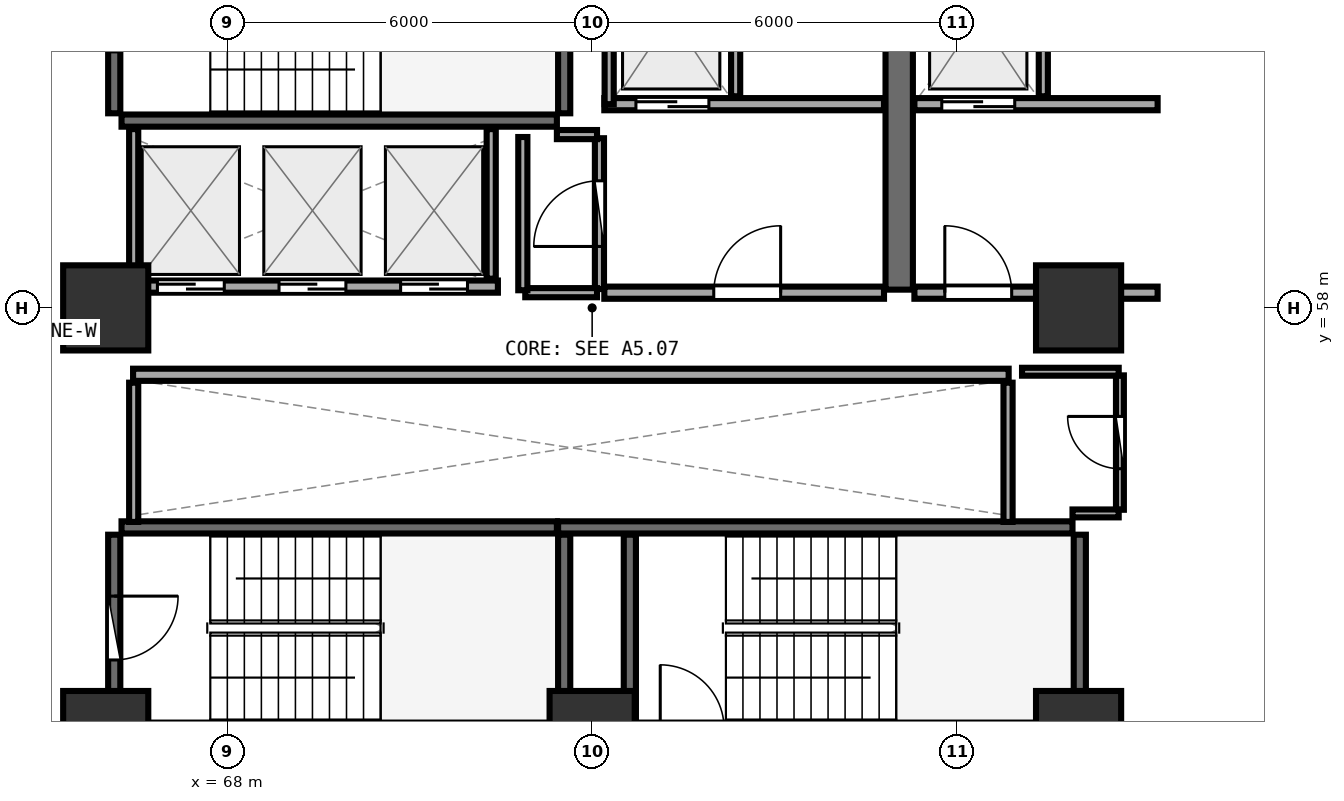
"""IFC4 building model, lengths in metres.
Left out: names, types, materials, properties, quantities, classifications, styles, units other than length and angle.
Written with IfcOpenShell. Run it as: python <this file> out.ifc"""

import sys

from ifc_helpers import new_model, si_unit, direction, frame, frame_2d, origin, origin_2d, place, context, subcontext, project, spatial, rectangle, extrude, element, fill, save


model = new_model("IFC4")
c1 = context("Model", 3, precision=1e-05, world=origin(), true_north=direction((0.0, 1.0)))
c2 = subcontext(c1, "Body", "Model", "MODEL_VIEW")
j1 = project(units=[si_unit("LENGTHUNIT", "METRE"), si_unit("PLANEANGLEUNIT", "RADIAN")], contexts=[c1])
p1 = place(None, origin())
s1 = spatial("IfcSite", under=j1, at=p1, CompositionType="ELEMENT")
p2 = place(p1, origin())
s2 = spatial("IfcBuilding", under=s1, at=p2, CompositionType="ELEMENT")
p3 = place(p2, frame((0.0, 0.0, 98.85)))
s3 = spatial("IfcBuildingStorey", under=s2, at=p3, CompositionType="ELEMENT", Elevation=98.85)
for number, where, z_axis, x_axis in (
    (1, (66.0, 51.0, 0.0), (0.0, 0.0, 1.0), (1.0, 0.0, 0.0)),
    (2, (74.0, 51.0, 0.0), (0.0, 0.0, 1.0), (1.0, 0.0, 0.0)),
    (3, (82.0, 51.0, 0.0), (0.0, 0.0, 1.0), (1.0, 0.0, 0.0)),
    (4, (82.0, 58.0, 0.0), (0.0, 0.0, 1.0), (1.0, 0.0, 0.0)),
    (5, (66.0, 58.0, 0.0), (0.0, 0.0, 1.0), (1.0, 0.0, 0.0)),
):
    element("IfcColumn", number, at=place(p3, frame(where, z_axis=z_axis, x_axis=x_axis)), inside=s3, PredefinedType="PILASTER", context=c2, shape_type="SweptSolid", body=[
        extrude(rectangle(XDim=1.4, YDim=1.4, at=origin_2d()), origin(), (0.0, 0.0, 1.0), 3.75),
    ])
p4 = place(p3, frame((66.26, 61.08, 0.0), z_axis=(0.0, 0.0, 1.0), x_axis=(1.0, 0.0, 0.0)))
e6 = element("IfcWall", 6, at=p4, inside=s3, PredefinedType="SHEAR", context=c2, shape_type="SweptSolid", body=[
    extrude(rectangle(XDim=7.16, YDim=0.2, at=frame_2d((3.58, 0.0))), origin(), (0.0, 0.0, 1.0), 3.49),
])
p5 = place(p3, frame((73.54, 61.2, 0.0), z_axis=(0.0, 0.0, 1.0), x_axis=(0.0, 1.0, 0.0)))
e7 = element("IfcWall", 7, at=p5, inside=s3, PredefinedType="SHEAR", context=c2, shape_type="SweptSolid", body=[
    extrude(rectangle(XDim=3.07, YDim=0.2, at=frame_2d((1.535, 0.0))), origin(), (0.0, 0.0, 1.0), 3.49),
])
p6 = place(p3, frame((66.14, 64.27, 0.0), z_axis=(0.0, 0.0, 1.0), x_axis=(0.0, -1.0, 0.0)))
e8 = element("IfcWall", 8, at=p6, inside=s3, PredefinedType="SHEAR", context=c2, shape_type="SweptSolid", body=[
    extrude(rectangle(XDim=3.07, YDim=0.2, at=frame_2d((1.535, 0.0))), origin(), (0.0, 0.0, 1.0), 3.49),
])
p7 = place(p6, frame((1.01, 0.0, 0.0)))
e9 = element("IfcOpeningElement", 9, at=p7, cuts=e8, PredefinedType="OPENING", context=c2, shape_type="SweptSolid", body=[
    extrude(rectangle(XDim=1.05, YDim=2.1, at=frame_2d((0.525, 1.05))), frame((0.0, 0.11, 0.0), z_axis=(0.0, -1.0, 0.0), x_axis=(1.0, 0.0, 0.0)), (0.0, 0.0, 1.0), 0.22),
])
p8 = place(p3, frame((82.02, 51.2, 0.0), z_axis=(0.0, 0.0, 1.0), x_axis=(0.0, 1.0, 0.0)))
e10 = element("IfcWall", 10, at=p8, inside=s3, PredefinedType="SHEAR", context=c2, shape_type="SweptSolid", body=[
    extrude(rectangle(XDim=3.07, YDim=0.2, at=frame_2d((1.535, 0.0))), origin(), (0.0, 0.0, 1.0), 3.49),
])
p9 = place(p3, frame((81.9, 54.39, 0.0), z_axis=(0.0, 0.0, 1.0), x_axis=(-1.0, 0.0, 0.0)))
e11 = element("IfcWall", 11, at=p9, inside=s3, PredefinedType="SHEAR", context=c2, shape_type="SweptSolid", body=[
    extrude(rectangle(XDim=8.46, YDim=0.2, at=frame_2d((4.23, 0.0))), origin(), (0.0, 0.0, 1.0), 3.49),
])
for number, where, z_axis, x_axis in (
    (12, (74.62, 54.27, 0.0), (0.0, 0.0, 1.0), (0.0, -1.0, 0.0)),
    (13, (73.54, 51.2, 0.0), (0.0, 0.0, 1.0), (0.0, 1.0, 0.0)),
):
    element("IfcWall", number, at=place(p3, frame(where, z_axis=z_axis, x_axis=x_axis)), inside=s3, PredefinedType="SHEAR", context=c2, shape_type="SweptSolid", body=[
        extrude(rectangle(XDim=3.07, YDim=0.2, at=frame_2d((1.535, 0.0))), origin(), (0.0, 0.0, 1.0), 3.49),
    ])
p10 = place(p3, frame((73.42, 54.39, 0.0), z_axis=(0.0, 0.0, 1.0), x_axis=(-1.0, 0.0, 0.0)))
e14 = element("IfcWall", 14, at=p10, inside=s3, PredefinedType="SHEAR", context=c2, shape_type="SweptSolid", body=[
    extrude(rectangle(XDim=7.16, YDim=0.2, at=frame_2d((3.58, 0.0))), origin(), (0.0, 0.0, 1.0), 3.49),
])
p11 = place(p3, frame((66.14, 54.27, 0.0), z_axis=(0.0, 0.0, 1.0), x_axis=(0.0, -1.0, 0.0)))
e15 = element("IfcWall", 15, at=p11, inside=s3, PredefinedType="SHEAR", context=c2, shape_type="SweptSolid", body=[
    extrude(rectangle(XDim=3.07, YDim=0.2, at=frame_2d((1.535, 0.0))), origin(), (0.0, 0.0, 1.0), 3.49),
])
p12 = place(p11, frame((1.01, 0.0, 0.0)))
e16 = element("IfcOpeningElement", 16, at=p12, cuts=e15, PredefinedType="OPENING", context=c2, shape_type="SweptSolid", body=[
    extrude(rectangle(XDim=1.05, YDim=2.1, at=frame_2d((0.525, 1.05))), frame((0.0, 0.11, 0.0), z_axis=(0.0, -1.0, 0.0), x_axis=(1.0, 0.0, 0.0)), (0.0, 0.0, 1.0), 0.22),
])
p13 = place(p3, frame((79.05, 58.3, 0.0), z_axis=(0.0, 0.0, 1.0), x_axis=(0.0, 1.0, 0.0)))
e17 = element("IfcWall", 17, at=p13, inside=s3, PredefinedType="SHEAR", context=c2, shape_type="SweptSolid", body=[
    extrude(rectangle(XDim=6.3, YDim=0.45, at=frame_2d((3.15, 0.0))), origin(), (0.0, 0.0, 1.0), 3.49),
])
p14 = place(p3, frame((74.2, 61.35, 0.0), z_axis=(0.0, 0.0, 1.0), x_axis=(1.0, 0.0, 0.0)))
e18 = element("IfcWall", 18, at=p14, inside=s3, PredefinedType="SOLIDWALL", context=c2, shape_type="SweptSolid", body=[
    extrude(rectangle(XDim=4.6, YDim=0.2, at=frame_2d((2.3, 0.0))), origin(), (0.0, 0.0, 1.0), 3.48),
])
p15 = place(p14, frame((0.52, 0.0, 0.0)))
e19 = element("IfcOpeningElement", 19, at=p15, cuts=e18, PredefinedType="OPENING", context=c2, shape_type="SweptSolid", body=[
    extrude(rectangle(XDim=1.2, YDim=2.15, at=frame_2d((0.6, 1.075))), frame((0.0, 0.11, 0.0), z_axis=(0.0, -1.0, 0.0), x_axis=(1.0, 0.0, 0.0)), (0.0, 0.0, 1.0), 0.22),
])
p16 = place(p3, frame((74.28, 61.35, 0.0), z_axis=(0.0, 0.0, 1.0), x_axis=(0.0, 1.0, 0.0)))
e20 = element("IfcWall", 20, at=p16, inside=s3, PredefinedType="PARTITIONING", context=c2, shape_type="SweptSolid", body=[
    extrude(rectangle(XDim=2.97, YDim=0.15, at=frame_2d((1.485, 0.0))), origin(), (0.0, 0.0, 1.0), 3.48),
])
p17 = place(p3, frame((76.36, 61.48, 0.0), z_axis=(0.0, 0.0, 1.0), x_axis=(0.0, 1.0, 0.0)))
e21 = element("IfcWall", 21, at=p17, inside=s3, PredefinedType="PARTITIONING", context=c2, shape_type="SweptSolid", body=[
    extrude(rectangle(XDim=2.84, YDim=0.15, at=frame_2d((1.42, 0.0))), origin(), (0.0, 0.0, 1.0), 3.48),
])
p18 = place(p3, frame((79.3, 61.35, 0.0), z_axis=(0.0, 0.0, 1.0), x_axis=(1.0, 0.0, 0.0)))
e22 = element("IfcWall", 22, at=p18, inside=s3, PredefinedType="SOLIDWALL", context=c2, shape_type="SweptSolid", body=[
    extrude(rectangle(XDim=4.0, YDim=0.2, at=frame_2d((2.0, 0.0))), origin(), (0.0, 0.0, 1.0), 2.775),
])
p19 = place(p18, frame((0.45, 0.0, 0.0)))
e23 = element("IfcOpeningElement", 23, at=p19, cuts=e22, PredefinedType="OPENING", context=c2, shape_type="SweptSolid", body=[
    extrude(rectangle(XDim=1.2, YDim=2.15, at=frame_2d((0.6, 1.075))), frame((0.0, 0.11, 0.0), z_axis=(0.0, -1.0, 0.0), x_axis=(1.0, 0.0, 0.0)), (0.0, 0.0, 1.0), 0.22),
])
p20 = place(p3, frame((81.42, 61.48, 0.0), z_axis=(0.0, 0.0, 1.0), x_axis=(0.0, 1.0, 0.0)))
e24 = element("IfcWall", 24, at=p20, inside=s3, PredefinedType="PARTITIONING", context=c2, shape_type="SweptSolid", body=[
    extrude(rectangle(XDim=2.84, YDim=0.15, at=frame_2d((1.42, 0.0))), origin(), (0.0, 0.0, 1.0), 3.48),
])
p21 = place(p3, frame((74.2, 58.25, 0.0), z_axis=(0.0, 0.0, 1.0), x_axis=(1.0, 0.0, 0.0)))
e25 = element("IfcWall", 25, at=p21, inside=s3, PredefinedType="SOLIDWALL", context=c2, shape_type="SweptSolid", body=[
    extrude(rectangle(XDim=4.6, YDim=0.2, at=frame_2d((2.3, 0.0))), origin(), (0.0, 0.0, 1.0), 3.48),
])
p22 = place(p21, frame((1.8, 0.0, 0.0)))
e26 = element("IfcOpeningElement", 26, at=p22, cuts=e25, PredefinedType="OPENING", context=c2, shape_type="SweptSolid", body=[
    extrude(rectangle(XDim=1.1, YDim=2.1, at=frame_2d((0.55, 1.05))), frame((0.0, 0.11, 0.0), z_axis=(0.0, -1.0, 0.0), x_axis=(1.0, 0.0, 0.0)), (0.0, 0.0, 1.0), 0.22),
])
p23 = place(p3, frame((79.3, 58.25, 0.0), z_axis=(0.0, 0.0, 1.0), x_axis=(1.0, 0.0, 0.0)))
e27 = element("IfcWall", 27, at=p23, inside=s3, PredefinedType="SOLIDWALL", context=c2, shape_type="SweptSolid", body=[
    extrude(rectangle(XDim=4.0, YDim=0.2, at=frame_2d((2.0, 0.0))), origin(), (0.0, 0.0, 1.0), 2.775),
])
p24 = place(p23, frame((0.5, 0.0, 0.0)))
e28 = element("IfcOpeningElement", 28, at=p24, cuts=e27, PredefinedType="OPENING", context=c2, shape_type="SweptSolid", body=[
    extrude(rectangle(XDim=1.1, YDim=2.1, at=frame_2d((0.55, 1.05))), frame((0.0, 0.11, 0.0), z_axis=(0.0, -1.0, 0.0), x_axis=(1.0, 0.0, 0.0)), (0.0, 0.0, 1.0), 0.22),
])
p25 = place(p3, frame((66.45, 58.35, 0.0), z_axis=(0.0, 0.0, 1.0), x_axis=(1.0, 0.0, 0.0)))
e29 = element("IfcWall", 29, at=p25, inside=s3, PredefinedType="SOLIDWALL", context=c2, shape_type="SweptSolid", body=[
    extrude(rectangle(XDim=6.0, YDim=0.2, at=frame_2d((3.0, 0.0))), origin(), (0.0, 0.0, 1.0), 3.48),
])
p26 = place(p25, frame((0.4, 0.0, 0.0)))
e30 = element("IfcOpeningElement", 30, at=p26, cuts=e29, PredefinedType="OPENING", context=c2, shape_type="SweptSolid", body=[
    extrude(rectangle(XDim=1.1, YDim=2.1, at=frame_2d((0.55, 1.05))), frame((0.0, 0.11, 0.0), z_axis=(0.0, -1.0, 0.0), x_axis=(1.0, 0.0, 0.0)), (0.0, 0.0, 1.0), 0.22),
])
p27 = place(p25, frame((2.4, 0.0, 0.0)))
e31 = element("IfcOpeningElement", 31, at=p27, cuts=e29, PredefinedType="OPENING", context=c2, shape_type="SweptSolid", body=[
    extrude(rectangle(XDim=1.1, YDim=2.1, at=frame_2d((0.55, 1.05))), frame((0.0, 0.11, 0.0), z_axis=(0.0, -1.0, 0.0), x_axis=(1.0, 0.0, 0.0)), (0.0, 0.0, 1.0), 0.22),
])
p28 = place(p25, frame((4.4, 0.0, 0.0)))
e32 = element("IfcOpeningElement", 32, at=p28, cuts=e29, PredefinedType="OPENING", context=c2, shape_type="SweptSolid", body=[
    extrude(rectangle(XDim=1.1, YDim=2.1, at=frame_2d((0.55, 1.05))), frame((0.0, 0.11, 0.0), z_axis=(0.0, -1.0, 0.0), x_axis=(1.0, 0.0, 0.0)), (0.0, 0.0, 1.0), 0.22),
])
for number, where, z_axis, x_axis in (
    (33, (66.46, 58.48, 0.0), (0.0, 0.0, 1.0), (0.0, 1.0, 0.0)),
    (34, (72.34, 58.48, 0.0), (0.0, 0.0, 1.0), (0.0, 1.0, 0.0)),
):
    element("IfcWall", number, at=place(p3, frame(where, z_axis=z_axis, x_axis=x_axis)), inside=s3, PredefinedType="PARTITIONING", context=c2, shape_type="SweptSolid", body=[
        extrude(rectangle(XDim=2.46, YDim=0.15, at=frame_2d((1.23, 0.0))), origin(), (0.0, 0.0, 1.0), 3.48),
    ])
p29 = place(p3, frame((66.45, 56.9, 0.0), z_axis=(0.0, 0.0, 1.0), x_axis=(1.0, 0.0, 0.0)))
e35 = element("IfcWall", 35, at=p29, inside=s3, PredefinedType="SOLIDWALL", context=c2, shape_type="SweptSolid", body=[
    extrude(rectangle(XDim=14.4, YDim=0.2, at=frame_2d((7.2, 0.0))), origin(), (0.0, 0.0, 1.0), 3.48),
])
for number, where, z_axis, x_axis in (
    (36, (66.46, 54.48, 0.0), (0.0, 0.0, 1.0), (0.0, 1.0, 0.0)),
    (37, (80.84, 54.48, 0.0), (0.0, 0.0, 1.0), (0.0, 1.0, 0.0)),
):
    element("IfcWall", number, at=place(p3, frame(where, z_axis=z_axis, x_axis=x_axis)), inside=s3, PredefinedType="PARTITIONING", context=c2, shape_type="SweptSolid", body=[
        extrude(rectangle(XDim=2.29, YDim=0.15, at=frame_2d((1.145, 0.0))), origin(), (0.0, 0.0, 1.0), 3.48),
    ])
p30 = place(p3, frame((74.12, 58.31, 0.0), z_axis=(0.0, 0.0, 1.0), x_axis=(0.0, 1.0, 0.0)))
e38 = element("IfcWall", 38, at=p30, inside=s3, PredefinedType="PARTITIONING", context=c2, shape_type="SweptSolid", body=[
    extrude(rectangle(XDim=2.48, YDim=0.15, at=frame_2d((1.24, 0.0))), origin(), (0.0, 0.0, 1.0), 3.48),
])
p31 = place(p30, frame((0.7, 0.0, 0.0)))
e39 = element("IfcOpeningElement", 39, at=p31, cuts=e38, PredefinedType="OPENING", context=c2, shape_type="SweptSolid", body=[
    extrude(rectangle(XDim=1.08, YDim=2.1, at=frame_2d((0.54, 1.05))), frame((0.0, 0.085, 0.0), z_axis=(0.0, -1.0, 0.0), x_axis=(1.0, 0.0, 0.0)), (0.0, 0.0, 1.0), 0.17),
])
p32 = place(p3, frame((82.68, 54.68, 0.0), z_axis=(0.0, 0.0, 1.0), x_axis=(0.0, 1.0, 0.0)))
e40 = element("IfcWall", 40, at=p32, inside=s3, PredefinedType="PLUMBINGWALL", context=c2, shape_type="SweptSolid", body=[
    extrude(rectangle(XDim=2.21, YDim=0.13, at=frame_2d((1.105, 0.0))), origin(), (0.0, 0.0, 1.0), 3.48),
])
p33 = place(p32, frame((0.675, 0.0, 0.0)))
e41 = element("IfcOpeningElement", 41, at=p33, cuts=e40, PredefinedType="OPENING", context=c2, shape_type="SweptSolid", body=[
    extrude(rectangle(XDim=0.86, YDim=2.05, at=frame_2d((0.43, 1.025))), frame((0.0, 0.075, 0.0), z_axis=(0.0, -1.0, 0.0), x_axis=(1.0, 0.0, 0.0)), (0.0, 0.0, 1.0), 0.15),
])
p34 = place(p3, frame((72.9, 58.25, 0.0), z_axis=(0.0, 0.0, 1.0), x_axis=(1.0, 0.0, 0.0)))
e42 = element("IfcWall", 42, at=p34, inside=s3, PredefinedType="PARTITIONING", context=c2, shape_type="SweptSolid", body=[
    extrude(rectangle(XDim=1.18, YDim=0.15, at=frame_2d((0.59, 0.0))), origin(), (0.0, 0.0, 1.0), 3.48),
])
p35 = place(p3, frame((74.08, 60.85, 0.0), z_axis=(0.0, 0.0, 1.0), x_axis=(-1.0, 0.0, 0.0)))
e43 = element("IfcWall", 43, at=p35, inside=s3, PredefinedType="PARTITIONING", context=c2, shape_type="SweptSolid", body=[
    extrude(rectangle(XDim=0.66, YDim=0.15, at=frame_2d((0.33, 0.0))), origin(), (0.0, 0.0, 1.0), 3.48),
])
p36 = place(p3, frame((72.86, 60.81, 0.0), z_axis=(0.0, 0.0, 1.0), x_axis=(0.0, -1.0, 0.0)))
e44 = element("IfcWall", 44, at=p36, inside=s3, PredefinedType="PARTITIONING", context=c2, shape_type="SweptSolid", body=[
    extrude(rectangle(XDim=2.52, YDim=0.15, at=frame_2d((1.26, 0.0))), origin(), (0.0, 0.0, 1.0), 3.48),
])
p37 = place(p3, frame((81.9, 54.62, 0.0), z_axis=(0.0, 0.0, 1.0), x_axis=(1.0, 0.0, 0.0)))
e45 = element("IfcWall", 45, at=p37, inside=s3, PredefinedType="PLUMBINGWALL", context=c2, shape_type="SweptSolid", body=[
    extrude(rectangle(XDim=0.76, YDim=0.13, at=frame_2d((0.38, 0.0))), origin(), (0.0, 0.0, 1.0), 2.775),
])
p38 = place(p3, frame((82.66, 56.95, 0.0), z_axis=(0.0, 0.0, 1.0), x_axis=(-1.0, 0.0, 0.0)))
e46 = element("IfcWall", 46, at=p38, inside=s3, PredefinedType="PLUMBINGWALL", context=c2, shape_type="SweptSolid", body=[
    extrude(rectangle(XDim=1.59, YDim=0.13, at=frame_2d((0.795, 0.0))), origin(), (0.0, 0.0, 1.0), 2.775),
])
p39 = place(p12, origin())
e47 = element("IfcDoor", 47, at=p39, inside=s3, OperationType="SINGLE_SWING_LEFT", PredefinedType="DOOR", context=c2, shape_type="SweptSolid", body=[
    extrude(rectangle(XDim=1.05, YDim=2.1, at=frame_2d((0.525, 1.05))), frame((0.0, 0.025, 0.0), z_axis=(0.0, -1.0, 0.0), x_axis=(1.0, 0.0, 0.0)), (0.0, 0.0, 1.0), 0.05),
])
fill(e16, e47)
p40 = place(p15, origin())
e48 = element("IfcDoor", 48, at=p40, inside=s3, OperationType="DOUBLE_DOOR_SLIDING", PredefinedType="DOOR", context=c2, shape_type="SweptSolid", body=[
    extrude(rectangle(XDim=1.2, YDim=2.15, at=frame_2d((0.6, 1.075))), frame((0.0, 0.025, 0.0), z_axis=(0.0, -1.0, 0.0), x_axis=(1.0, 0.0, 0.0)), (0.0, 0.0, 1.0), 0.05),
])
fill(e19, e48)
p41 = place(p19, origin())
e49 = element("IfcDoor", 49, at=p41, inside=s3, OperationType="DOUBLE_DOOR_SLIDING", PredefinedType="DOOR", context=c2, shape_type="SweptSolid", body=[
    extrude(rectangle(XDim=1.2, YDim=2.15, at=frame_2d((0.6, 1.075))), frame((0.0, 0.025, 0.0), z_axis=(0.0, -1.0, 0.0), x_axis=(1.0, 0.0, 0.0)), (0.0, 0.0, 1.0), 0.05),
])
fill(e23, e49)
p42 = place(p22, frame((1.1, 0.0, 0.0), z_axis=(0.0, 0.0, 1.0), x_axis=(-1.0, 0.0, 0.0)))
e50 = element("IfcDoor", 50, at=p42, inside=s3, OperationType="SINGLE_SWING_LEFT", PredefinedType="DOOR", context=c2, shape_type="SweptSolid", body=[
    extrude(rectangle(XDim=1.1, YDim=2.1, at=frame_2d((0.55, 1.05))), frame((0.0, 0.025, 0.0), z_axis=(0.0, -1.0, 0.0), x_axis=(1.0, 0.0, 0.0)), (0.0, 0.0, 1.0), 0.05),
])
fill(e26, e50)
p43 = place(p24, frame((1.1, 0.0, 0.0), z_axis=(0.0, 0.0, 1.0), x_axis=(-1.0, 0.0, 0.0)))
e51 = element("IfcDoor", 51, at=p43, inside=s3, OperationType="SINGLE_SWING_RIGHT", PredefinedType="DOOR", context=c2, shape_type="SweptSolid", body=[
    extrude(rectangle(XDim=1.1, YDim=2.1, at=frame_2d((0.55, 1.05))), frame((0.0, 0.025, 0.0), z_axis=(0.0, -1.0, 0.0), x_axis=(1.0, 0.0, 0.0)), (0.0, 0.0, 1.0), 0.05),
])
fill(e28, e51)
p44 = place(p26, origin())
e52 = element("IfcDoor", 52, at=p44, inside=s3, OperationType="DOUBLE_DOOR_SLIDING", PredefinedType="DOOR", context=c2, shape_type="SweptSolid", body=[
    extrude(rectangle(XDim=1.1, YDim=2.1, at=frame_2d((0.55, 1.05))), frame((0.0, 0.025, 0.0), z_axis=(0.0, -1.0, 0.0), x_axis=(1.0, 0.0, 0.0)), (0.0, 0.0, 1.0), 0.05),
])
fill(e30, e52)
p45 = place(p27, origin())
e53 = element("IfcDoor", 53, at=p45, inside=s3, OperationType="DOUBLE_DOOR_SLIDING", PredefinedType="DOOR", context=c2, shape_type="SweptSolid", body=[
    extrude(rectangle(XDim=1.1, YDim=2.1, at=frame_2d((0.55, 1.05))), frame((0.0, 0.025, 0.0), z_axis=(0.0, -1.0, 0.0), x_axis=(1.0, 0.0, 0.0)), (0.0, 0.0, 1.0), 0.05),
])
fill(e31, e53)
p46 = place(p28, origin())
e54 = element("IfcDoor", 54, at=p46, inside=s3, OperationType="DOUBLE_DOOR_SLIDING", PredefinedType="DOOR", context=c2, shape_type="SweptSolid", body=[
    extrude(rectangle(XDim=1.1, YDim=2.1, at=frame_2d((0.55, 1.05))), frame((0.0, 0.025, 0.0), z_axis=(0.0, -1.0, 0.0), x_axis=(1.0, 0.0, 0.0)), (0.0, 0.0, 1.0), 0.05),
])
fill(e32, e54)
p47 = place(p31, origin())
e55 = element("IfcDoor", 55, at=p47, inside=s3, OperationType="SINGLE_SWING_LEFT", PredefinedType="DOOR", context=c2, shape_type="SweptSolid", body=[
    extrude(rectangle(XDim=1.08, YDim=2.1, at=frame_2d((0.54, 1.05))), frame((0.0, 0.025, 0.0), z_axis=(0.0, -1.0, 0.0), x_axis=(1.0, 0.0, 0.0)), (0.0, 0.0, 1.0), 0.05),
])
fill(e39, e55)
p48 = place(p33, origin())
e56 = element("IfcDoor", 56, at=p48, inside=s3, OperationType="SINGLE_SWING_RIGHT", PredefinedType="DOOR", context=c2, shape_type="SweptSolid", body=[
    extrude(rectangle(XDim=0.86, YDim=2.05, at=frame_2d((0.43, 1.025))), frame((0.0, 0.025, 0.0), z_axis=(0.0, -1.0, 0.0), x_axis=(1.0, 0.0, 0.0)), (0.0, 0.0, 1.0), 0.05),
])
fill(e41, e56)
save(model, sys.argv[1])
